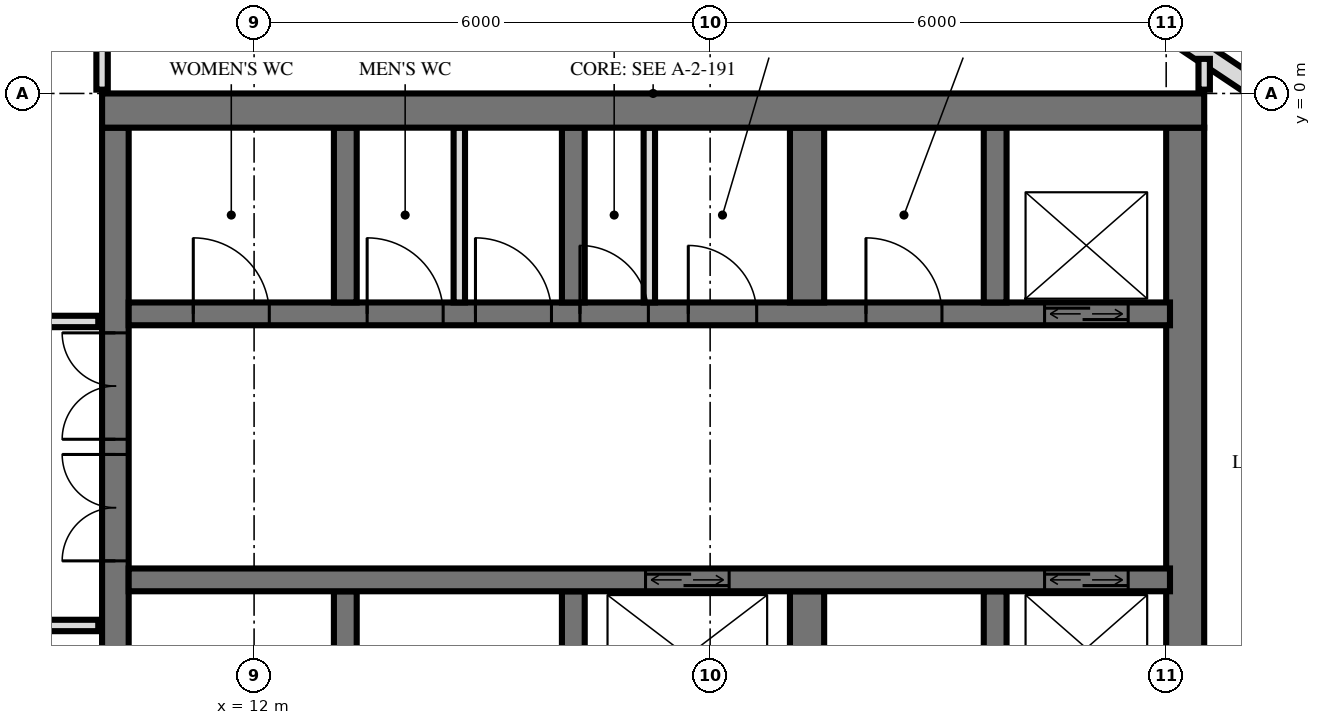
"""IFC4 building model, lengths in metres.
Left out: names, types, materials, properties, quantities, classifications, styles, units other than length and angle.
Written with IfcOpenShell. Run it as: python <this file> out.ifc"""

import sys

from ifc_helpers import new_model, si_unit, direction, frame, frame_2d, origin, place, context, subcontext, project, spatial, rectangle, extrude, element, fill, save


model = new_model("IFC4")
c1 = context("Model", 3, precision=1e-05, world=origin(), true_north=direction((0.0, 1.0)))
c2 = subcontext(c1, "Body", "Model", "MODEL_VIEW")
j1 = project(units=[si_unit("LENGTHUNIT", "METRE"), si_unit("PLANEANGLEUNIT", "RADIAN")], contexts=[c1])
p1 = place(None, origin())
s1 = spatial("IfcSite", under=j1, at=p1, CompositionType="ELEMENT")
p2 = place(p1, origin())
s2 = spatial("IfcBuilding", under=s1, at=p2, CompositionType="ELEMENT")
p3 = place(p2, frame((0.0, 0.0, 215.1)))
s3 = spatial("IfcBuildingStorey", under=s2, at=p3, CompositionType="ELEMENT", Elevation=215.1)
p4 = place(p3, frame((10.0, -0.225, 0.0), z_axis=(0.0, 0.0, 1.0), x_axis=(1.0, 0.0, 0.0)))
e1 = element("IfcWall", 1, at=p4, inside=s3, PredefinedType="SHEAR", context=c2, shape_type="SweptSolid", body=[
    extrude(rectangle(XDim=14.5, YDim=0.45, at=frame_2d((7.25, 0.0))), origin(), (0.0, 0.0, 1.0), 3.5),
])
p5 = place(p3, frame((10.175, -14.55, 0.0), z_axis=(0.0, 0.0, 1.0), x_axis=(0.0, 1.0, 0.0)))
e2 = element("IfcWall", 2, at=p5, inside=s3, PredefinedType="SHEAR", context=c2, shape_type="SweptSolid", body=[
    extrude(rectangle(XDim=14.1, YDim=0.35, at=frame_2d((7.05, 0.0))), origin(), (0.0, 0.0, 1.0), 3.5),
])
p6 = place(p5, frame((8.4, 0.0, 0.0)))
e3 = element("IfcOpeningElement", 3, at=p6, cuts=e2, PredefinedType="OPENING", context=c2, shape_type="SweptSolid", body=[
    extrude(rectangle(XDim=1.4, YDim=2.4, at=frame_2d((0.7, 1.2))), frame((0.0, 0.185, 0.0), z_axis=(0.0, -1.0, 0.0), x_axis=(1.0, 0.0, 0.0)), (0.0, 0.0, 1.0), 0.37),
])
p7 = place(p5, frame((10.0, 0.0, 0.0)))
e4 = element("IfcOpeningElement", 4, at=p7, cuts=e2, PredefinedType="OPENING", context=c2, shape_type="SweptSolid", body=[
    extrude(rectangle(XDim=1.4, YDim=2.4, at=frame_2d((0.7, 1.2))), frame((0.0, 0.185, 0.0), z_axis=(0.0, -1.0, 0.0), x_axis=(1.0, 0.0, 0.0)), (0.0, 0.0, 1.0), 0.37),
])
p8 = place(p5, frame((4.0, 0.0, 0.0)))
e5 = element("IfcOpeningElement", 5, at=p8, cuts=e2, PredefinedType="OPENING", context=c2, shape_type="SweptSolid", body=[
    extrude(rectangle(XDim=1.2, YDim=2.1, at=frame_2d((0.6, 1.05))), frame((0.0, 0.185, 0.0), z_axis=(0.0, -1.0, 0.0), x_axis=(1.0, 0.0, 0.0)), (0.0, 0.0, 1.0), 0.37),
])
p9 = place(p3, frame((24.25, -14.55, 0.0), z_axis=(0.0, 0.0, 1.0), x_axis=(0.0, 1.0, 0.0)))
e6 = element("IfcWall", 6, at=p9, inside=s3, PredefinedType="SHEAR", context=c2, shape_type="SweptSolid", body=[
    extrude(rectangle(XDim=14.1, YDim=0.5, at=frame_2d((7.05, 0.0))), origin(), (0.0, 0.0, 1.0), 3.5),
])
p10 = place(p3, frame((10.35, -2.9, 0.0), z_axis=(0.0, 0.0, 1.0), x_axis=(1.0, 0.0, 0.0)))
e7 = element("IfcWall", 7, at=p10, inside=s3, PredefinedType="SHEAR", context=c2, shape_type="SweptSolid", body=[
    extrude(rectangle(XDim=13.7, YDim=0.3, at=frame_2d((6.85, 0.0))), origin(), (0.0, 0.0, 1.0), 3.5),
])
p11 = place(p10, frame((12.05, 0.0, 0.0)))
e8 = element("IfcOpeningElement", 8, at=p11, cuts=e7, PredefinedType="OPENING", context=c2, shape_type="SweptSolid", body=[
    extrude(rectangle(XDim=1.1, YDim=2.1, at=frame_2d((0.55, 1.05))), frame((0.0, 0.16, 0.0), z_axis=(0.0, -1.0, 0.0), x_axis=(1.0, 0.0, 0.0)), (0.0, 0.0, 1.0), 0.32),
])
p12 = place(p10, frame((5.938, 0.0, 0.0)))
e9 = element("IfcOpeningElement", 9, at=p12, cuts=e7, PredefinedType="OPENING", context=c2, shape_type="SweptSolid", body=[
    extrude(rectangle(XDim=0.9, YDim=2.1, at=frame_2d((0.45, 1.05))), frame((0.0, 0.16, 0.0), z_axis=(0.0, -1.0, 0.0), x_axis=(1.0, 0.0, 0.0)), (0.0, 0.0, 1.0), 0.32),
])
p13 = place(p10, frame((7.363, 0.0, 0.0)))
e10 = element("IfcOpeningElement", 10, at=p13, cuts=e7, PredefinedType="OPENING", context=c2, shape_type="SweptSolid", body=[
    extrude(rectangle(XDim=0.9, YDim=2.1, at=frame_2d((0.45, 1.05))), frame((0.0, 0.16, 0.0), z_axis=(0.0, -1.0, 0.0), x_axis=(1.0, 0.0, 0.0)), (0.0, 0.0, 1.0), 0.32),
])
p14 = place(p10, frame((0.85, 0.0, 0.0)))
e11 = element("IfcOpeningElement", 11, at=p14, cuts=e7, PredefinedType="OPENING", context=c2, shape_type="SweptSolid", body=[
    extrude(rectangle(XDim=1.0, YDim=2.1, at=frame_2d((0.5, 1.05))), frame((0.0, 0.16, 0.0), z_axis=(0.0, -1.0, 0.0), x_axis=(1.0, 0.0, 0.0)), (0.0, 0.0, 1.0), 0.32),
])
p15 = place(p10, frame((3.137, 0.0, 0.0)))
e12 = element("IfcOpeningElement", 12, at=p15, cuts=e7, PredefinedType="OPENING", context=c2, shape_type="SweptSolid", body=[
    extrude(rectangle(XDim=1.0, YDim=2.1, at=frame_2d((0.5, 1.05))), frame((0.0, 0.16, 0.0), z_axis=(0.0, -1.0, 0.0), x_axis=(1.0, 0.0, 0.0)), (0.0, 0.0, 1.0), 0.32),
])
p16 = place(p10, frame((4.562, 0.0, 0.0)))
e13 = element("IfcOpeningElement", 13, at=p16, cuts=e7, PredefinedType="OPENING", context=c2, shape_type="SweptSolid", body=[
    extrude(rectangle(XDim=1.0, YDim=2.1, at=frame_2d((0.5, 1.05))), frame((0.0, 0.16, 0.0), z_axis=(0.0, -1.0, 0.0), x_axis=(1.0, 0.0, 0.0)), (0.0, 0.0, 1.0), 0.32),
])
p17 = place(p10, frame((9.7, 0.0, 0.0)))
e14 = element("IfcOpeningElement", 14, at=p17, cuts=e7, PredefinedType="OPENING", context=c2, shape_type="SweptSolid", body=[
    extrude(rectangle(XDim=1.0, YDim=2.1, at=frame_2d((0.5, 1.05))), frame((0.0, 0.16, 0.0), z_axis=(0.0, -1.0, 0.0), x_axis=(1.0, 0.0, 0.0)), (0.0, 0.0, 1.0), 0.32),
])
p18 = place(p3, frame((10.35, -6.4, 0.0), z_axis=(0.0, 0.0, 1.0), x_axis=(1.0, 0.0, 0.0)))
e15 = element("IfcWall", 15, at=p18, inside=s3, PredefinedType="SHEAR", context=c2, shape_type="SweptSolid", body=[
    extrude(rectangle(XDim=13.7, YDim=0.3, at=frame_2d((6.85, 0.0))), origin(), (0.0, 0.0, 1.0), 3.5),
])
p19 = place(p18, frame((12.05, 0.0, 0.0)))
e16 = element("IfcOpeningElement", 16, at=p19, cuts=e15, PredefinedType="OPENING", context=c2, shape_type="SweptSolid", body=[
    extrude(rectangle(XDim=1.1, YDim=2.1, at=frame_2d((0.55, 1.05))), frame((0.0, 0.16, 0.0), z_axis=(0.0, -1.0, 0.0), x_axis=(1.0, 0.0, 0.0)), (0.0, 0.0, 1.0), 0.32),
])
p20 = place(p18, frame((6.8, 0.0, 0.0)))
e17 = element("IfcOpeningElement", 17, at=p20, cuts=e15, PredefinedType="OPENING", context=c2, shape_type="SweptSolid", body=[
    extrude(rectangle(XDim=1.1, YDim=2.1, at=frame_2d((0.55, 1.05))), frame((0.0, 0.16, 0.0), z_axis=(0.0, -1.0, 0.0), x_axis=(1.0, 0.0, 0.0)), (0.0, 0.0, 1.0), 0.32),
])
for number, where, z_axis, x_axis in (
    (18, (13.2, -2.75, 0.0), (0.0, 0.0, 1.0), (0.0, 1.0, 0.0)),
    (19, (13.2, -8.85, 0.0), (0.0, 0.0, 1.0), (0.0, 1.0, 0.0)),
    (20, (16.2, -2.75, 0.0), (0.0, 0.0, 1.0), (0.0, 1.0, 0.0)),
    (21, (16.2, -8.85, 0.0), (0.0, 0.0, 1.0), (0.0, 1.0, 0.0)),
):
    element("IfcWall", number, at=place(p3, frame(where, z_axis=z_axis, x_axis=x_axis)), inside=s3, PredefinedType="SHEAR", context=c2, shape_type="SweptSolid", body=[
        extrude(rectangle(XDim=2.3, YDim=0.3, at=frame_2d((1.15, 0.0))), origin(), (0.0, 0.0, 1.0), 3.5),
    ])
for number, where, z_axis, x_axis in (
    (22, (19.275, -2.75, 0.0), (0.0, 0.0, 1.0), (0.0, 1.0, 0.0)),
    (23, (19.275, -8.85, 0.0), (0.0, 0.0, 1.0), (0.0, 1.0, 0.0)),
):
    element("IfcWall", number, at=place(p3, frame(where, z_axis=z_axis, x_axis=x_axis)), inside=s3, PredefinedType="SHEAR", context=c2, shape_type="SweptSolid", body=[
        extrude(rectangle(XDim=2.3, YDim=0.45, at=frame_2d((1.15, 0.0))), origin(), (0.0, 0.0, 1.0), 3.5),
    ])
for number, where, z_axis, x_axis in (
    (24, (21.75, -2.75, 0.0), (0.0, 0.0, 1.0), (0.0, 1.0, 0.0)),
    (25, (21.75, -8.85, 0.0), (0.0, 0.0, 1.0), (0.0, 1.0, 0.0)),
):
    element("IfcWall", number, at=place(p3, frame(where, z_axis=z_axis, x_axis=x_axis)), inside=s3, PredefinedType="SHEAR", context=c2, shape_type="SweptSolid", body=[
        extrude(rectangle(XDim=2.3, YDim=0.3, at=frame_2d((1.15, 0.0))), origin(), (0.0, 0.0, 1.0), 3.5),
    ])
p21 = place(p3, frame((25.571, -0.194, 0.0), z_axis=(0.0, 0.0, 1.0), x_axis=(-0.831482937015, 0.55555029066, 0.0)))
e26 = element("IfcWall", 26, at=p21, inside=s3, PredefinedType="SOLIDWALL", context=c2, shape_type="SweptSolid", body=[
    extrude(rectangle(XDim=1.656, YDim=0.25, at=frame_2d((0.828, 0.0))), origin(), (0.0, 0.0, 1.0), 3.22),
])
for number, where, z_axis, x_axis in (
    (27, (17.2, -2.75, 0.0), (0.0, 0.0, 1.0), (0.0, 1.0, 0.0)),
    (28, (14.7, -2.75, 0.0), (0.0, 0.0, 1.0), (0.0, 1.0, 0.0)),
):
    element("IfcWall", number, at=place(p3, frame(where, z_axis=z_axis, x_axis=x_axis)), inside=s3, PredefinedType="PARTITIONING", context=c2, shape_type="SweptSolid", body=[
        extrude(rectangle(XDim=2.3, YDim=0.15, at=frame_2d((1.15, 0.0))), origin(), (0.0, 0.0, 1.0), 3.2),
    ])
p22 = place(p3, frame((24.5, 0.05, 0.0), z_axis=(0.0, 0.0, 1.0), x_axis=(0.0, 1.0, 0.0)))
e29 = element("IfcWall", 29, at=p22, inside=s3, PredefinedType="PARTITIONING", context=c2, shape_type="SweptSolid", body=[
    extrude(rectangle(XDim=0.405, YDim=0.15, at=frame_2d((0.203, 0.0))), origin(), (0.0, 0.0, 1.0), 3.22),
])
p23 = place(p3, frame((10.0, 0.05, 0.0), z_axis=(0.0, 0.0, 1.0), x_axis=(0.0, 1.0, 0.0)))
e30 = element("IfcWall", 30, at=p23, inside=s3, PredefinedType="PARTITIONING", context=c2, shape_type="SweptSolid", body=[
    extrude(rectangle(XDim=0.97, YDim=0.15, at=frame_2d((0.485, 0.0))), origin(), (0.0, 0.0, 1.0), 3.22),
])
p24 = place(p3, frame((-9.95, -7.0, 0.0), z_axis=(0.0, 0.0, 1.0), x_axis=(1.0, 0.0, 0.0)))
e31 = element("IfcWall", 31, at=p24, inside=s3, PredefinedType="PARTITIONING", context=c2, shape_type="SweptSolid", body=[
    extrude(rectangle(XDim=19.9, YDim=0.15, at=frame_2d((9.95, 0.0))), origin(), (0.0, 0.0, 1.0), 3.22),
])
p25 = place(p24, frame((9.45, 0.0, 0.0)))
e32 = element("IfcOpeningElement", 32, at=p25, cuts=e31, PredefinedType="OPENING", context=c2, shape_type="SweptSolid", body=[
    extrude(rectangle(XDim=1.0, YDim=2.1, at=frame_2d((0.5, 1.05))), frame((0.0, 0.085, 0.0), z_axis=(0.0, -1.0, 0.0), x_axis=(1.0, 0.0, 0.0)), (0.0, 0.0, 1.0), 0.17),
])
p26 = place(p24, frame((15.45, 0.0, 0.0)))
e33 = element("IfcOpeningElement", 33, at=p26, cuts=e31, PredefinedType="OPENING", context=c2, shape_type="SweptSolid", body=[
    extrude(rectangle(XDim=1.0, YDim=2.1, at=frame_2d((0.5, 1.05))), frame((0.0, 0.085, 0.0), z_axis=(0.0, -1.0, 0.0), x_axis=(1.0, 0.0, 0.0)), (0.0, 0.0, 1.0), 0.17),
])
p27 = place(p3, frame((-9.95, -3.0, 0.0), z_axis=(0.0, 0.0, 1.0), x_axis=(1.0, 0.0, 0.0)))
e34 = element("IfcWall", 34, at=p27, inside=s3, PredefinedType="PARTITIONING", context=c2, shape_type="SweptSolid", body=[
    extrude(rectangle(XDim=19.9, YDim=0.15, at=frame_2d((9.95, 0.0))), origin(), (0.0, 0.0, 1.0), 3.22),
])
p28 = place(p27, frame((0.95, 0.0, 0.0)))
e35 = element("IfcOpeningElement", 35, at=p28, cuts=e34, PredefinedType="OPENING", context=c2, shape_type="SweptSolid", body=[
    extrude(rectangle(XDim=1.0, YDim=2.1, at=frame_2d((0.5, 1.05))), frame((0.0, 0.085, 0.0), z_axis=(0.0, -1.0, 0.0), x_axis=(1.0, 0.0, 0.0)), (0.0, 0.0, 1.0), 0.17),
])
p29 = place(p27, frame((3.7, 0.0, 0.0)))
e36 = element("IfcOpeningElement", 36, at=p29, cuts=e34, PredefinedType="OPENING", context=c2, shape_type="SweptSolid", body=[
    extrude(rectangle(XDim=1.0, YDim=2.1, at=frame_2d((0.5, 1.05))), frame((0.0, 0.085, 0.0), z_axis=(0.0, -1.0, 0.0), x_axis=(1.0, 0.0, 0.0)), (0.0, 0.0, 1.0), 0.17),
])
p30 = place(p27, frame((7.95, 0.0, 0.0)))
e37 = element("IfcOpeningElement", 37, at=p30, cuts=e34, PredefinedType="OPENING", context=c2, shape_type="SweptSolid", body=[
    extrude(rectangle(XDim=1.0, YDim=2.1, at=frame_2d((0.5, 1.05))), frame((0.0, 0.085, 0.0), z_axis=(0.0, -1.0, 0.0), x_axis=(1.0, 0.0, 0.0)), (0.0, 0.0, 1.0), 0.17),
])
p31 = place(p27, frame((15.2, 0.0, 0.0)))
e38 = element("IfcOpeningElement", 38, at=p31, cuts=e34, PredefinedType="OPENING", context=c2, shape_type="SweptSolid", body=[
    extrude(rectangle(XDim=1.0, YDim=2.1, at=frame_2d((0.5, 1.05))), frame((0.0, 0.085, 0.0), z_axis=(0.0, -1.0, 0.0), x_axis=(1.0, 0.0, 0.0)), (0.0, 0.0, 1.0), 0.17),
])
p32 = place(p11, origin())
e39 = element("IfcDoor", 39, at=p32, inside=s3, OperationType="DOUBLE_DOOR_SLIDING", PredefinedType="USERDEFINED", context=c2, shape_type="SweptSolid", body=[
    extrude(rectangle(XDim=1.1, YDim=2.1, at=frame_2d((0.55, 1.05))), frame((0.0, 0.025, 0.0), z_axis=(0.0, -1.0, 0.0), x_axis=(1.0, 0.0, 0.0)), (0.0, 0.0, 1.0), 0.05),
])
fill(e8, e39)
p33 = place(p19, origin())
e40 = element("IfcDoor", 40, at=p33, inside=s3, OperationType="DOUBLE_DOOR_SLIDING", PredefinedType="USERDEFINED", context=c2, shape_type="SweptSolid", body=[
    extrude(rectangle(XDim=1.1, YDim=2.1, at=frame_2d((0.55, 1.05))), frame((0.0, 0.025, 0.0), z_axis=(0.0, -1.0, 0.0), x_axis=(1.0, 0.0, 0.0)), (0.0, 0.0, 1.0), 0.05),
])
fill(e16, e40)
p34 = place(p20, origin())
e41 = element("IfcDoor", 41, at=p34, inside=s3, OperationType="DOUBLE_DOOR_SLIDING", PredefinedType="USERDEFINED", context=c2, shape_type="SweptSolid", body=[
    extrude(rectangle(XDim=1.1, YDim=2.1, at=frame_2d((0.55, 1.05))), frame((0.0, 0.025, 0.0), z_axis=(0.0, -1.0, 0.0), x_axis=(1.0, 0.0, 0.0)), (0.0, 0.0, 1.0), 0.05),
])
fill(e17, e41)
p35 = place(p6, origin())
e42 = element("IfcDoor", 42, at=p35, inside=s3, OperationType="DOUBLE_DOOR_SINGLE_SWING", PredefinedType="DOOR", context=c2, shape_type="SweptSolid", body=[
    extrude(rectangle(XDim=1.4, YDim=2.4, at=frame_2d((0.7, 1.2))), frame((0.0, 0.025, 0.0), z_axis=(0.0, -1.0, 0.0), x_axis=(1.0, 0.0, 0.0)), (0.0, 0.0, 1.0), 0.05),
])
fill(e3, e42)
p36 = place(p7, origin())
e43 = element("IfcDoor", 43, at=p36, inside=s3, OperationType="DOUBLE_DOOR_SINGLE_SWING", PredefinedType="DOOR", context=c2, shape_type="SweptSolid", body=[
    extrude(rectangle(XDim=1.4, YDim=2.4, at=frame_2d((0.7, 1.2))), frame((0.0, 0.025, 0.0), z_axis=(0.0, -1.0, 0.0), x_axis=(1.0, 0.0, 0.0)), (0.0, 0.0, 1.0), 0.05),
])
fill(e4, e43)
p37 = place(p12, origin())
e44 = element("IfcDoor", 44, at=p37, inside=s3, OperationType="SINGLE_SWING_RIGHT", PredefinedType="DOOR", context=c2, shape_type="SweptSolid", body=[
    extrude(rectangle(XDim=0.9, YDim=2.1, at=frame_2d((0.45, 1.05))), frame((0.0, 0.025, 0.0), z_axis=(0.0, -1.0, 0.0), x_axis=(1.0, 0.0, 0.0)), (0.0, 0.0, 1.0), 0.05),
])
fill(e9, e44)
p38 = place(p13, origin())
e45 = element("IfcDoor", 45, at=p38, inside=s3, OperationType="SINGLE_SWING_RIGHT", PredefinedType="DOOR", context=c2, shape_type="SweptSolid", body=[
    extrude(rectangle(XDim=0.9, YDim=2.1, at=frame_2d((0.45, 1.05))), frame((0.0, 0.025, 0.0), z_axis=(0.0, -1.0, 0.0), x_axis=(1.0, 0.0, 0.0)), (0.0, 0.0, 1.0), 0.05),
])
fill(e10, e45)
p39 = place(p14, origin())
e46 = element("IfcDoor", 46, at=p39, inside=s3, OperationType="SINGLE_SWING_RIGHT", PredefinedType="DOOR", context=c2, shape_type="SweptSolid", body=[
    extrude(rectangle(XDim=1.0, YDim=2.1, at=frame_2d((0.5, 1.05))), frame((0.0, 0.025, 0.0), z_axis=(0.0, -1.0, 0.0), x_axis=(1.0, 0.0, 0.0)), (0.0, 0.0, 1.0), 0.05),
])
fill(e11, e46)
p40 = place(p15, origin())
e47 = element("IfcDoor", 47, at=p40, inside=s3, OperationType="SINGLE_SWING_RIGHT", PredefinedType="DOOR", context=c2, shape_type="SweptSolid", body=[
    extrude(rectangle(XDim=1.0, YDim=2.1, at=frame_2d((0.5, 1.05))), frame((0.0, 0.025, 0.0), z_axis=(0.0, -1.0, 0.0), x_axis=(1.0, 0.0, 0.0)), (0.0, 0.0, 1.0), 0.05),
])
fill(e12, e47)
p41 = place(p16, origin())
e48 = element("IfcDoor", 48, at=p41, inside=s3, OperationType="SINGLE_SWING_RIGHT", PredefinedType="DOOR", context=c2, shape_type="SweptSolid", body=[
    extrude(rectangle(XDim=1.0, YDim=2.1, at=frame_2d((0.5, 1.05))), frame((0.0, 0.025, 0.0), z_axis=(0.0, -1.0, 0.0), x_axis=(1.0, 0.0, 0.0)), (0.0, 0.0, 1.0), 0.05),
])
fill(e13, e48)
p42 = place(p17, origin())
e49 = element("IfcDoor", 49, at=p42, inside=s3, OperationType="SINGLE_SWING_RIGHT", PredefinedType="DOOR", context=c2, shape_type="SweptSolid", body=[
    extrude(rectangle(XDim=1.0, YDim=2.1, at=frame_2d((0.5, 1.05))), frame((0.0, 0.025, 0.0), z_axis=(0.0, -1.0, 0.0), x_axis=(1.0, 0.0, 0.0)), (0.0, 0.0, 1.0), 0.05),
])
fill(e14, e49)
save(model, sys.argv[1])
